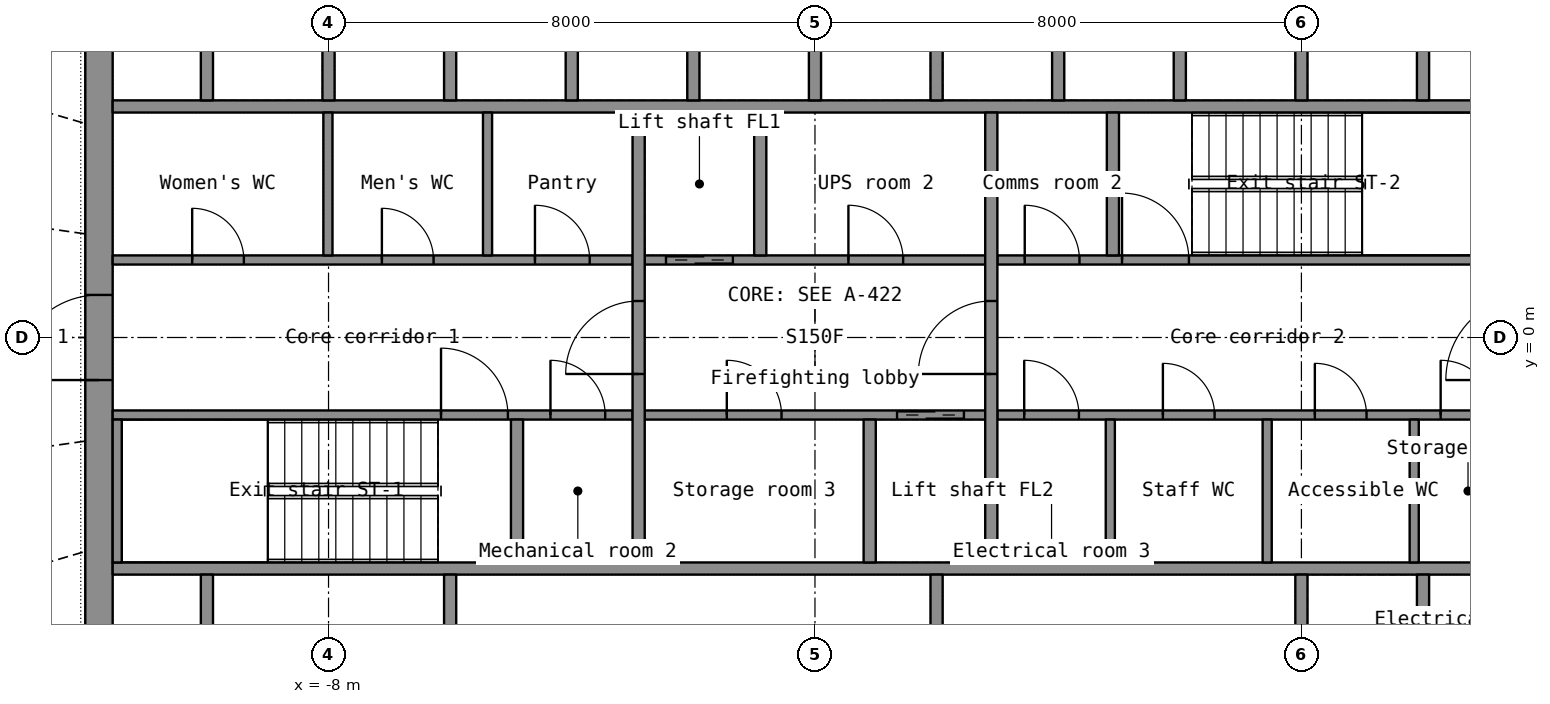
"""IFC4 building model, lengths in metres.
Left out: names, types, materials, properties, quantities, classifications, styles, units other than length and angle.
Written with IfcOpenShell. Run it as: python <this file> out.ifc"""

import sys

from ifc_helpers import new_model, si_unit, direction, frame, frame_2d, origin, place, context, subcontext, project, spatial, rectangle, extrude, element, fill, save


model = new_model("IFC4")
c1 = context("Model", 3, precision=1e-05, world=origin(), true_north=direction((0.0, 1.0)))
c2 = subcontext(c1, "Body", "Model", "MODEL_VIEW")
j1 = project(units=[si_unit("LENGTHUNIT", "METRE"), si_unit("PLANEANGLEUNIT", "RADIAN")], contexts=[c1])
p1 = place(None, origin())
s1 = spatial("IfcSite", under=j1, at=p1, CompositionType="ELEMENT")
p2 = place(p1, origin())
s2 = spatial("IfcBuilding", under=s1, at=p2, CompositionType="ELEMENT")
p3 = place(p2, frame((0.0, 0.0, 157.1)))
s3 = spatial("IfcBuildingStorey", under=s2, at=p3, CompositionType="ELEMENT", Elevation=157.1)
p4 = place(p3, frame((-11.775, -7.2, 0.0), z_axis=(0.0, 0.0, 1.0), x_axis=(0.0, 1.0, 0.0)))
e1 = element("IfcWall", 1, at=p4, inside=s3, PredefinedType="SHEAR", context=c2, shape_type="SweptSolid", body=[
    extrude(rectangle(XDim=14.4, YDim=0.45, at=frame_2d((7.2, 0.0))), origin(), (0.0, 0.0, 1.0), 3.3),
])
p5 = place(p4, frame((6.5, 0.0, 0.0)))
e2 = element("IfcOpeningElement", 2, at=p5, cuts=e1, PredefinedType="OPENING", context=c2, shape_type="SweptSolid", body=[
    extrude(rectangle(XDim=1.4, YDim=2.2, at=frame_2d((0.7, 1.1))), frame((0.0, 0.235, 0.0), z_axis=(0.0, -1.0, 0.0), x_axis=(1.0, 0.0, 0.0)), (0.0, 0.0, 1.0), 0.47),
])
for number, where, z_axis, x_axis in (
    (3, (-11.55, -3.8, 0.0), (0.0, 0.0, 1.0), (1.0, 0.0, 0.0)),
    (4, (-11.55, 3.8, 0.0), (0.0, 0.0, 1.0), (1.0, 0.0, 0.0)),
):
    element("IfcWall", number, at=place(p3, frame(where, z_axis=z_axis, x_axis=x_axis)), inside=s3, PredefinedType="SHEAR", context=c2, shape_type="SweptSolid", body=[
        extrude(rectangle(XDim=23.1, YDim=0.2, at=frame_2d((11.55, 0.0))), origin(), (0.0, 0.0, 1.0), 3.3),
    ])
for number, where, z_axis, x_axis in (
    (5, (-10.0, -6.75, 0.0), (0.0, 0.0, 1.0), (0.0, 1.0, 0.0)),
    (6, (8.0, -6.75, 0.0), (0.0, 0.0, 1.0), (0.0, 1.0, 0.0)),
    (7, (10.0, -6.75, 0.0), (0.0, 0.0, 1.0), (0.0, 1.0, 0.0)),
):
    element("IfcWall", number, at=place(p3, frame(where, z_axis=z_axis, x_axis=x_axis)), inside=s3, PredefinedType="SHEAR", context=c2, shape_type="SweptSolid", body=[
        extrude(rectangle(XDim=2.85, YDim=0.2, at=frame_2d((1.425, 0.0))), origin(), (0.0, 0.0, 1.0), 3.3),
    ])
for number, where, z_axis, x_axis in (
    (8, (-6.0, -6.75, 0.0), (0.0, 0.0, 1.0), (0.0, 1.0, 0.0)),
    (9, (2.0, -6.75, 0.0), (0.0, 0.0, 1.0), (0.0, 1.0, 0.0)),
):
    element("IfcWall", number, at=place(p3, frame(where, z_axis=z_axis, x_axis=x_axis)), inside=s3, PredefinedType="PARTITIONING", context=c2, shape_type="SweptSolid", body=[
        extrude(rectangle(XDim=2.85, YDim=0.2, at=frame_2d((1.425, 0.0))), origin(), (0.0, 0.0, 1.0), 3.3),
    ])
for number, where, z_axis, x_axis in (
    (10, (-10.0, 3.9, 0.0), (0.0, 0.0, 1.0), (0.0, 1.0, 0.0)),
    (11, (-8.0, 3.9, 0.0), (0.0, 0.0, 1.0), (0.0, 1.0, 0.0)),
    (12, (-6.0, 3.9, 0.0), (0.0, 0.0, 1.0), (0.0, 1.0, 0.0)),
    (13, (-4.0, 3.9, 0.0), (0.0, 0.0, 1.0), (0.0, 1.0, 0.0)),
    (14, (-2.0, 3.9, 0.0), (0.0, 0.0, 1.0), (0.0, 1.0, 0.0)),
    (15, (0.0, 3.9, 0.0), (0.0, 0.0, 1.0), (0.0, 1.0, 0.0)),
    (16, (2.0, 3.9, 0.0), (0.0, 0.0, 1.0), (0.0, 1.0, 0.0)),
    (17, (4.0, 3.9, 0.0), (0.0, 0.0, 1.0), (0.0, 1.0, 0.0)),
    (18, (6.0, 3.9, 0.0), (0.0, 0.0, 1.0), (0.0, 1.0, 0.0)),
    (19, (8.0, 3.9, 0.0), (0.0, 0.0, 1.0), (0.0, 1.0, 0.0)),
    (20, (10.0, 3.9, 0.0), (0.0, 0.0, 1.0), (0.0, 1.0, 0.0)),
):
    element("IfcWall", number, at=place(p3, frame(where, z_axis=z_axis, x_axis=x_axis)), inside=s3, PredefinedType="SHEAR", context=c2, shape_type="SweptSolid", body=[
        extrude(rectangle(XDim=2.85, YDim=0.2, at=frame_2d((1.425, 0.0))), origin(), (0.0, 0.0, 1.0), 3.3),
    ])
p6 = place(p3, frame((-11.55, -1.275, 0.0), z_axis=(0.0, 0.0, 1.0), x_axis=(1.0, 0.0, 0.0)))
e21 = element("IfcWall", 21, at=p6, inside=s3, PredefinedType="SHEAR", context=c2, shape_type="SweptSolid", body=[
    extrude(rectangle(XDim=8.55, YDim=0.15, at=frame_2d((4.275, 0.0))), origin(), (0.0, 0.0, 1.0), 3.3),
])
p7 = place(p6, frame((5.4, 0.0, 0.0)))
e22 = element("IfcOpeningElement", 22, at=p7, cuts=e21, PredefinedType="OPENING", context=c2, shape_type="SweptSolid", body=[
    extrude(rectangle(XDim=1.1, YDim=2.15, at=frame_2d((0.55, 1.075))), frame((0.0, 0.085, 0.0), z_axis=(0.0, -1.0, 0.0), x_axis=(1.0, 0.0, 0.0)), (0.0, 0.0, 1.0), 0.17),
])
p8 = place(p6, frame((7.2, 0.0, 0.0)))
e23 = element("IfcOpeningElement", 23, at=p8, cuts=e21, PredefinedType="OPENING", context=c2, shape_type="SweptSolid", body=[
    extrude(rectangle(XDim=0.9, YDim=2.1, at=frame_2d((0.45, 1.05))), frame((0.0, 0.085, 0.0), z_axis=(0.0, -1.0, 0.0), x_axis=(1.0, 0.0, 0.0)), (0.0, 0.0, 1.0), 0.17),
])
p9 = place(p3, frame((-2.8, -1.275, 0.0), z_axis=(0.0, 0.0, 1.0), x_axis=(1.0, 0.0, 0.0)))
e24 = element("IfcWall", 24, at=p9, inside=s3, PredefinedType="SHEAR", context=c2, shape_type="SweptSolid", body=[
    extrude(rectangle(XDim=5.6, YDim=0.15, at=frame_2d((2.8, 0.0))), origin(), (0.0, 0.0, 1.0), 3.3),
])
p10 = place(p9, frame((4.15, 0.0, 0.0)))
e25 = element("IfcOpeningElement", 25, at=p10, cuts=e24, PredefinedType="OPENING", context=c2, shape_type="SweptSolid", body=[
    extrude(rectangle(XDim=1.1, YDim=2.2, at=frame_2d((0.55, 1.1))), frame((0.0, 0.085, 0.0), z_axis=(0.0, -1.0, 0.0), x_axis=(1.0, 0.0, 0.0)), (0.0, 0.0, 1.0), 0.17),
])
p11 = place(p9, frame((1.35, 0.0, 0.0)))
e26 = element("IfcOpeningElement", 26, at=p11, cuts=e24, PredefinedType="OPENING", context=c2, shape_type="SweptSolid", body=[
    extrude(rectangle(XDim=0.9, YDim=2.1, at=frame_2d((0.45, 1.05))), frame((0.0, 0.085, 0.0), z_axis=(0.0, -1.0, 0.0), x_axis=(1.0, 0.0, 0.0)), (0.0, 0.0, 1.0), 0.17),
])
p12 = place(p3, frame((3.0, -1.275, 0.0), z_axis=(0.0, 0.0, 1.0), x_axis=(1.0, 0.0, 0.0)))
e27 = element("IfcWall", 27, at=p12, inside=s3, PredefinedType="PARTITIONING", context=c2, shape_type="SweptSolid", body=[
    extrude(rectangle(XDim=8.55, YDim=0.15, at=frame_2d((4.275, 0.0))), origin(), (0.0, 0.0, 1.0), 3.3),
])
p13 = place(p12, frame((0.441, 0.0, 0.0)))
e28 = element("IfcOpeningElement", 28, at=p13, cuts=e27, PredefinedType="OPENING", context=c2, shape_type="SweptSolid", body=[
    extrude(rectangle(XDim=0.9, YDim=2.1, at=frame_2d((0.45, 1.05))), frame((0.0, 0.085, 0.0), z_axis=(0.0, -1.0, 0.0), x_axis=(1.0, 0.0, 0.0)), (0.0, 0.0, 1.0), 0.17),
])
p14 = place(p12, frame((2.722, 0.0, 0.0)))
e29 = element("IfcOpeningElement", 29, at=p14, cuts=e27, PredefinedType="OPENING", context=c2, shape_type="SweptSolid", body=[
    extrude(rectangle(XDim=0.85, YDim=2.1, at=frame_2d((0.425, 1.05))), frame((0.0, 0.085, 0.0), z_axis=(0.0, -1.0, 0.0), x_axis=(1.0, 0.0, 0.0)), (0.0, 0.0, 1.0), 0.17),
])
p15 = place(p12, frame((5.221, 0.0, 0.0)))
e30 = element("IfcOpeningElement", 30, at=p15, cuts=e27, PredefinedType="OPENING", context=c2, shape_type="SweptSolid", body=[
    extrude(rectangle(XDim=0.85, YDim=2.1, at=frame_2d((0.425, 1.05))), frame((0.0, 0.085, 0.0), z_axis=(0.0, -1.0, 0.0), x_axis=(1.0, 0.0, 0.0)), (0.0, 0.0, 1.0), 0.17),
])
p16 = place(p12, frame((7.29, 0.0, 0.0)))
e31 = element("IfcOpeningElement", 31, at=p16, cuts=e27, PredefinedType="OPENING", context=c2, shape_type="SweptSolid", body=[
    extrude(rectangle(XDim=0.9, YDim=2.1, at=frame_2d((0.45, 1.05))), frame((0.0, 0.085, 0.0), z_axis=(0.0, -1.0, 0.0), x_axis=(1.0, 0.0, 0.0)), (0.0, 0.0, 1.0), 0.17),
])
p17 = place(p3, frame((-11.55, 1.275, 0.0), z_axis=(0.0, 0.0, 1.0), x_axis=(1.0, 0.0, 0.0)))
e32 = element("IfcWall", 32, at=p17, inside=s3, PredefinedType="PARTITIONING", context=c2, shape_type="SweptSolid", body=[
    extrude(rectangle(XDim=8.55, YDim=0.15, at=frame_2d((4.275, 0.0))), origin(), (0.0, 0.0, 1.0), 3.3),
])
p18 = place(p17, frame((1.308, 0.0, 0.0)))
e33 = element("IfcOpeningElement", 33, at=p18, cuts=e32, PredefinedType="OPENING", context=c2, shape_type="SweptSolid", body=[
    extrude(rectangle(XDim=0.85, YDim=2.1, at=frame_2d((0.425, 1.05))), frame((0.0, 0.085, 0.0), z_axis=(0.0, -1.0, 0.0), x_axis=(1.0, 0.0, 0.0)), (0.0, 0.0, 1.0), 0.17),
])
p19 = place(p17, frame((4.427, 0.0, 0.0)))
e34 = element("IfcOpeningElement", 34, at=p19, cuts=e32, PredefinedType="OPENING", context=c2, shape_type="SweptSolid", body=[
    extrude(rectangle(XDim=0.85, YDim=2.1, at=frame_2d((0.425, 1.05))), frame((0.0, 0.085, 0.0), z_axis=(0.0, -1.0, 0.0), x_axis=(1.0, 0.0, 0.0)), (0.0, 0.0, 1.0), 0.17),
])
p20 = place(p17, frame((6.945, 0.0, 0.0)))
e35 = element("IfcOpeningElement", 35, at=p20, cuts=e32, PredefinedType="OPENING", context=c2, shape_type="SweptSolid", body=[
    extrude(rectangle(XDim=0.9, YDim=2.1, at=frame_2d((0.45, 1.05))), frame((0.0, 0.085, 0.0), z_axis=(0.0, -1.0, 0.0), x_axis=(1.0, 0.0, 0.0)), (0.0, 0.0, 1.0), 0.17),
])
p21 = place(p3, frame((-2.8, 1.275, 0.0), z_axis=(0.0, 0.0, 1.0), x_axis=(1.0, 0.0, 0.0)))
e36 = element("IfcWall", 36, at=p21, inside=s3, PredefinedType="SHEAR", context=c2, shape_type="SweptSolid", body=[
    extrude(rectangle(XDim=5.6, YDim=0.15, at=frame_2d((2.8, 0.0))), origin(), (0.0, 0.0, 1.0), 3.3),
])
p22 = place(p21, frame((0.35, 0.0, 0.0)))
e37 = element("IfcOpeningElement", 37, at=p22, cuts=e36, PredefinedType="OPENING", context=c2, shape_type="SweptSolid", body=[
    extrude(rectangle(XDim=1.1, YDim=2.2, at=frame_2d((0.55, 1.1))), frame((0.0, 0.085, 0.0), z_axis=(0.0, -1.0, 0.0), x_axis=(1.0, 0.0, 0.0)), (0.0, 0.0, 1.0), 0.17),
])
p23 = place(p21, frame((3.35, 0.0, 0.0)))
e38 = element("IfcOpeningElement", 38, at=p23, cuts=e36, PredefinedType="OPENING", context=c2, shape_type="SweptSolid", body=[
    extrude(rectangle(XDim=0.9, YDim=2.1, at=frame_2d((0.45, 1.05))), frame((0.0, 0.085, 0.0), z_axis=(0.0, -1.0, 0.0), x_axis=(1.0, 0.0, 0.0)), (0.0, 0.0, 1.0), 0.17),
])
p24 = place(p3, frame((3.0, 1.275, 0.0), z_axis=(0.0, 0.0, 1.0), x_axis=(1.0, 0.0, 0.0)))
e39 = element("IfcWall", 39, at=p24, inside=s3, PredefinedType="SHEAR", context=c2, shape_type="SweptSolid", body=[
    extrude(rectangle(XDim=8.55, YDim=0.15, at=frame_2d((4.275, 0.0))), origin(), (0.0, 0.0, 1.0), 3.3),
])
p25 = place(p24, frame((2.05, 0.0, 0.0)))
e40 = element("IfcOpeningElement", 40, at=p25, cuts=e39, PredefinedType="OPENING", context=c2, shape_type="SweptSolid", body=[
    extrude(rectangle(XDim=1.1, YDim=2.15, at=frame_2d((0.55, 1.075))), frame((0.0, 0.085, 0.0), z_axis=(0.0, -1.0, 0.0), x_axis=(1.0, 0.0, 0.0)), (0.0, 0.0, 1.0), 0.17),
])
p26 = place(p24, frame((0.45, 0.0, 0.0)))
e41 = element("IfcOpeningElement", 41, at=p26, cuts=e39, PredefinedType="OPENING", context=c2, shape_type="SweptSolid", body=[
    extrude(rectangle(XDim=0.9, YDim=2.1, at=frame_2d((0.45, 1.05))), frame((0.0, 0.085, 0.0), z_axis=(0.0, -1.0, 0.0), x_axis=(1.0, 0.0, 0.0)), (0.0, 0.0, 1.0), 0.17),
])
p27 = place(p3, frame((-2.9, -3.7, 0.0), z_axis=(0.0, 0.0, 1.0), x_axis=(0.0, 1.0, 0.0)))
e42 = element("IfcWall", 42, at=p27, inside=s3, PredefinedType="SHEAR", context=c2, shape_type="SweptSolid", body=[
    extrude(rectangle(XDim=7.4, YDim=0.2, at=frame_2d((3.7, 0.0))), origin(), (0.0, 0.0, 1.0), 3.3),
])
p28 = place(p27, frame((3.1, 0.0, 0.0)))
e43 = element("IfcOpeningElement", 43, at=p28, cuts=e42, PredefinedType="OPENING", context=c2, shape_type="SweptSolid", body=[
    extrude(rectangle(XDim=1.2, YDim=2.2, at=frame_2d((0.6, 1.1))), frame((0.0, 0.11, 0.0), z_axis=(0.0, -1.0, 0.0), x_axis=(1.0, 0.0, 0.0)), (0.0, 0.0, 1.0), 0.22),
])
p29 = place(p3, frame((2.9, -3.7, 0.0), z_axis=(0.0, 0.0, 1.0), x_axis=(0.0, 1.0, 0.0)))
e44 = element("IfcWall", 44, at=p29, inside=s3, PredefinedType="SHEAR", context=c2, shape_type="SweptSolid", body=[
    extrude(rectangle(XDim=7.4, YDim=0.2, at=frame_2d((3.7, 0.0))), origin(), (0.0, 0.0, 1.0), 3.3),
])
p30 = place(p29, frame((3.1, 0.0, 0.0)))
e45 = element("IfcOpeningElement", 45, at=p30, cuts=e44, PredefinedType="OPENING", context=c2, shape_type="SweptSolid", body=[
    extrude(rectangle(XDim=1.2, YDim=2.2, at=frame_2d((0.6, 1.1))), frame((0.0, 0.11, 0.0), z_axis=(0.0, -1.0, 0.0), x_axis=(1.0, 0.0, 0.0)), (0.0, 0.0, 1.0), 0.22),
])
for number, where, z_axis, x_axis in (
    (46, (-0.9, 1.35, 0.0), (0.0, 0.0, 1.0), (0.0, 1.0, 0.0)),
    (47, (0.9, -3.7, 0.0), (0.0, 0.0, 1.0), (0.0, 1.0, 0.0)),
):
    element("IfcWall", number, at=place(p3, frame(where, z_axis=z_axis, x_axis=x_axis)), inside=s3, PredefinedType="SHEAR", context=c2, shape_type="SweptSolid", body=[
        extrude(rectangle(XDim=2.35, YDim=0.2, at=frame_2d((1.175, 0.0))), origin(), (0.0, 0.0, 1.0), 3.3),
    ])
p31 = place(p3, frame((-11.475, -3.7, 0.0), z_axis=(0.0, 0.0, 1.0), x_axis=(0.0, 1.0, 0.0)))
e48 = element("IfcWall", 48, at=p31, inside=s3, PredefinedType="SHEAR", context=c2, shape_type="SweptSolid", body=[
    extrude(rectangle(XDim=2.35, YDim=0.15, at=frame_2d((1.175, 0.0))), origin(), (0.0, 0.0, 1.0), 3.3),
])
for number, where, z_axis, x_axis in (
    (49, (-4.9, -3.7, 0.0), (0.0, 0.0, 1.0), (0.0, 1.0, 0.0)),
    (50, (4.9, 1.35, 0.0), (0.0, 0.0, 1.0), (0.0, 1.0, 0.0)),
):
    element("IfcWall", number, at=place(p3, frame(where, z_axis=z_axis, x_axis=x_axis)), inside=s3, PredefinedType="SHEAR", context=c2, shape_type="SweptSolid", body=[
        extrude(rectangle(XDim=2.35, YDim=0.2, at=frame_2d((1.175, 0.0))), origin(), (0.0, 0.0, 1.0), 3.3),
    ])
for number, where, z_axis, x_axis in (
    (51, (-8.01, 1.35, 0.0), (0.0, 0.0, 1.0), (0.0, 1.0, 0.0)),
    (52, (-5.385, 1.35, 0.0), (0.0, 0.0, 1.0), (0.0, 1.0, 0.0)),
    (53, (4.857, -3.7, 0.0), (0.0, 0.0, 1.0), (0.0, 1.0, 0.0)),
    (54, (7.437, -3.7, 0.0), (0.0, 0.0, 1.0), (0.0, 1.0, 0.0)),
    (55, (9.855, -3.7, 0.0), (0.0, 0.0, 1.0), (0.0, 1.0, 0.0)),
):
    element("IfcWall", number, at=place(p3, frame(where, z_axis=z_axis, x_axis=x_axis)), inside=s3, PredefinedType="PARTITIONING", context=c2, shape_type="SweptSolid", body=[
        extrude(rectangle(XDim=2.35, YDim=0.15, at=frame_2d((1.175, 0.0))), origin(), (0.0, 0.0, 1.0), 3.3),
    ])
p32 = place(p5, origin())
e56 = element("IfcDoor", 56, at=p32, inside=s3, OperationType="DOUBLE_DOOR_SINGLE_SWING", PredefinedType="DOOR", context=c2, shape_type="SweptSolid", body=[
    extrude(rectangle(XDim=1.4, YDim=2.2, at=frame_2d((0.7, 1.1))), frame((0.0, 0.025, 0.0), z_axis=(0.0, -1.0, 0.0), x_axis=(1.0, 0.0, 0.0)), (0.0, 0.0, 1.0), 0.05),
])
fill(e2, e56)
p33 = place(p28, origin())
e57 = element("IfcDoor", 57, at=p33, inside=s3, OperationType="SINGLE_SWING_LEFT", PredefinedType="DOOR", context=c2, shape_type="SweptSolid", body=[
    extrude(rectangle(XDim=1.2, YDim=2.2, at=frame_2d((0.6, 1.1))), frame((0.0, 0.025, 0.0), z_axis=(0.0, -1.0, 0.0), x_axis=(1.0, 0.0, 0.0)), (0.0, 0.0, 1.0), 0.05),
])
fill(e43, e57)
p34 = place(p30, origin())
e58 = element("IfcDoor", 58, at=p34, inside=s3, OperationType="SINGLE_SWING_LEFT", PredefinedType="DOOR", context=c2, shape_type="SweptSolid", body=[
    extrude(rectangle(XDim=1.2, YDim=2.2, at=frame_2d((0.6, 1.1))), frame((0.0, 0.025, 0.0), z_axis=(0.0, -1.0, 0.0), x_axis=(1.0, 0.0, 0.0)), (0.0, 0.0, 1.0), 0.05),
])
fill(e45, e58)
p35 = place(p22, origin())
e59 = element("IfcDoor", 59, at=p35, inside=s3, OperationType="DOUBLE_DOOR_SLIDING", PredefinedType="DOOR", context=c2, shape_type="SweptSolid", body=[
    extrude(rectangle(XDim=1.1, YDim=2.2, at=frame_2d((0.55, 1.1))), frame((0.0, 0.025, 0.0), z_axis=(0.0, -1.0, 0.0), x_axis=(1.0, 0.0, 0.0)), (0.0, 0.0, 1.0), 0.05),
])
fill(e37, e59)
p36 = place(p10, origin())
e60 = element("IfcDoor", 60, at=p36, inside=s3, OperationType="DOUBLE_DOOR_SLIDING", PredefinedType="DOOR", context=c2, shape_type="SweptSolid", body=[
    extrude(rectangle(XDim=1.1, YDim=2.2, at=frame_2d((0.55, 1.1))), frame((0.0, 0.025, 0.0), z_axis=(0.0, -1.0, 0.0), x_axis=(1.0, 0.0, 0.0)), (0.0, 0.0, 1.0), 0.05),
])
fill(e25, e60)
p37 = place(p7, origin())
e61 = element("IfcDoor", 61, at=p37, inside=s3, OperationType="SINGLE_SWING_LEFT", PredefinedType="DOOR", context=c2, shape_type="SweptSolid", body=[
    extrude(rectangle(XDim=1.1, YDim=2.15, at=frame_2d((0.55, 1.075))), frame((0.0, 0.025, 0.0), z_axis=(0.0, -1.0, 0.0), x_axis=(1.0, 0.0, 0.0)), (0.0, 0.0, 1.0), 0.05),
])
fill(e22, e61)
p38 = place(p25, origin())
e62 = element("IfcDoor", 62, at=p38, inside=s3, OperationType="SINGLE_SWING_LEFT", PredefinedType="DOOR", context=c2, shape_type="SweptSolid", body=[
    extrude(rectangle(XDim=1.1, YDim=2.15, at=frame_2d((0.55, 1.075))), frame((0.0, 0.025, 0.0), z_axis=(0.0, -1.0, 0.0), x_axis=(1.0, 0.0, 0.0)), (0.0, 0.0, 1.0), 0.05),
])
fill(e40, e62)
p39 = place(p18, origin())
e63 = element("IfcDoor", 63, at=p39, inside=s3, OperationType="SINGLE_SWING_LEFT", PredefinedType="DOOR", context=c2, shape_type="SweptSolid", body=[
    extrude(rectangle(XDim=0.85, YDim=2.1, at=frame_2d((0.425, 1.05))), frame((0.0, 0.025, 0.0), z_axis=(0.0, -1.0, 0.0), x_axis=(1.0, 0.0, 0.0)), (0.0, 0.0, 1.0), 0.05),
])
fill(e33, e63)
p40 = place(p19, origin())
e64 = element("IfcDoor", 64, at=p40, inside=s3, OperationType="SINGLE_SWING_LEFT", PredefinedType="DOOR", context=c2, shape_type="SweptSolid", body=[
    extrude(rectangle(XDim=0.85, YDim=2.1, at=frame_2d((0.425, 1.05))), frame((0.0, 0.025, 0.0), z_axis=(0.0, -1.0, 0.0), x_axis=(1.0, 0.0, 0.0)), (0.0, 0.0, 1.0), 0.05),
])
fill(e34, e64)
p41 = place(p20, origin())
e65 = element("IfcDoor", 65, at=p41, inside=s3, OperationType="SINGLE_SWING_LEFT", PredefinedType="DOOR", context=c2, shape_type="SweptSolid", body=[
    extrude(rectangle(XDim=0.9, YDim=2.1, at=frame_2d((0.45, 1.05))), frame((0.0, 0.025, 0.0), z_axis=(0.0, -1.0, 0.0), x_axis=(1.0, 0.0, 0.0)), (0.0, 0.0, 1.0), 0.05),
])
fill(e35, e65)
p42 = place(p13, origin())
e66 = element("IfcDoor", 66, at=p42, inside=s3, OperationType="SINGLE_SWING_LEFT", PredefinedType="DOOR", context=c2, shape_type="SweptSolid", body=[
    extrude(rectangle(XDim=0.9, YDim=2.1, at=frame_2d((0.45, 1.05))), frame((0.0, 0.025, 0.0), z_axis=(0.0, -1.0, 0.0), x_axis=(1.0, 0.0, 0.0)), (0.0, 0.0, 1.0), 0.05),
])
fill(e28, e66)
p43 = place(p14, origin())
e67 = element("IfcDoor", 67, at=p43, inside=s3, OperationType="SINGLE_SWING_LEFT", PredefinedType="DOOR", context=c2, shape_type="SweptSolid", body=[
    extrude(rectangle(XDim=0.85, YDim=2.1, at=frame_2d((0.425, 1.05))), frame((0.0, 0.025, 0.0), z_axis=(0.0, -1.0, 0.0), x_axis=(1.0, 0.0, 0.0)), (0.0, 0.0, 1.0), 0.05),
])
fill(e29, e67)
p44 = place(p15, origin())
e68 = element("IfcDoor", 68, at=p44, inside=s3, OperationType="SINGLE_SWING_LEFT", PredefinedType="DOOR", context=c2, shape_type="SweptSolid", body=[
    extrude(rectangle(XDim=0.85, YDim=2.1, at=frame_2d((0.425, 1.05))), frame((0.0, 0.025, 0.0), z_axis=(0.0, -1.0, 0.0), x_axis=(1.0, 0.0, 0.0)), (0.0, 0.0, 1.0), 0.05),
])
fill(e30, e68)
p45 = place(p16, origin())
e69 = element("IfcDoor", 69, at=p45, inside=s3, OperationType="SINGLE_SWING_LEFT", PredefinedType="DOOR", context=c2, shape_type="SweptSolid", body=[
    extrude(rectangle(XDim=0.9, YDim=2.1, at=frame_2d((0.45, 1.05))), frame((0.0, 0.025, 0.0), z_axis=(0.0, -1.0, 0.0), x_axis=(1.0, 0.0, 0.0)), (0.0, 0.0, 1.0), 0.05),
])
fill(e31, e69)
p46 = place(p23, origin())
e70 = element("IfcDoor", 70, at=p46, inside=s3, OperationType="SINGLE_SWING_LEFT", PredefinedType="DOOR", context=c2, shape_type="SweptSolid", body=[
    extrude(rectangle(XDim=0.9, YDim=2.1, at=frame_2d((0.45, 1.05))), frame((0.0, 0.025, 0.0), z_axis=(0.0, -1.0, 0.0), x_axis=(1.0, 0.0, 0.0)), (0.0, 0.0, 1.0), 0.05),
])
fill(e38, e70)
p47 = place(p11, origin())
e71 = element("IfcDoor", 71, at=p47, inside=s3, OperationType="SINGLE_SWING_LEFT", PredefinedType="DOOR", context=c2, shape_type="SweptSolid", body=[
    extrude(rectangle(XDim=0.9, YDim=2.1, at=frame_2d((0.45, 1.05))), frame((0.0, 0.025, 0.0), z_axis=(0.0, -1.0, 0.0), x_axis=(1.0, 0.0, 0.0)), (0.0, 0.0, 1.0), 0.05),
])
fill(e26, e71)
p48 = place(p26, origin())
e72 = element("IfcDoor", 72, at=p48, inside=s3, OperationType="SINGLE_SWING_LEFT", PredefinedType="DOOR", context=c2, shape_type="SweptSolid", body=[
    extrude(rectangle(XDim=0.9, YDim=2.1, at=frame_2d((0.45, 1.05))), frame((0.0, 0.025, 0.0), z_axis=(0.0, -1.0, 0.0), x_axis=(1.0, 0.0, 0.0)), (0.0, 0.0, 1.0), 0.05),
])
fill(e41, e72)
p49 = place(p8, origin())
e73 = element("IfcDoor", 73, at=p49, inside=s3, OperationType="SINGLE_SWING_LEFT", PredefinedType="DOOR", context=c2, shape_type="SweptSolid", body=[
    extrude(rectangle(XDim=0.9, YDim=2.1, at=frame_2d((0.45, 1.05))), frame((0.0, 0.025, 0.0), z_axis=(0.0, -1.0, 0.0), x_axis=(1.0, 0.0, 0.0)), (0.0, 0.0, 1.0), 0.05),
])
fill(e23, e73)
save(model, sys.argv[1])
